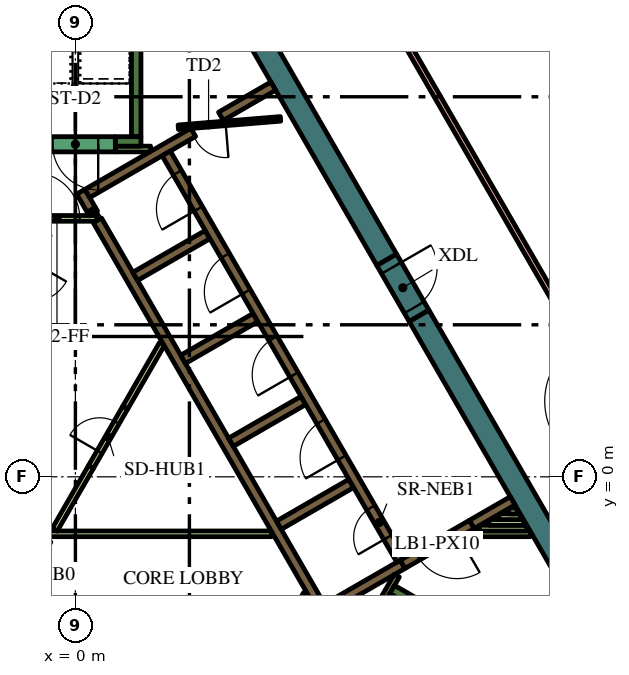
"""IFC4 building model, lengths in metres.
Left out: names, types, materials, properties, quantities, classifications, styles, units other than length and angle.
Written with IfcOpenShell. Run it as: python <this file> out.ifc"""

import sys

from ifc_helpers import new_model, si_unit, direction, frame, frame_2d, origin, place, context, subcontext, project, spatial, rectangle, extrude, element, fill, save


model = new_model("IFC4")
c1 = context("Model", 3, precision=1e-05, world=origin(), true_north=direction((0.0, 1.0)))
c2 = subcontext(c1, "Body", "Model", "MODEL_VIEW")
j1 = project(units=[si_unit("LENGTHUNIT", "METRE"), si_unit("PLANEANGLEUNIT", "RADIAN")], contexts=[c1])
p1 = place(None, origin())
s1 = spatial("IfcSite", under=j1, at=p1, CompositionType="ELEMENT")
p2 = place(p1, origin())
s2 = spatial("IfcBuilding", under=s1, at=p2, CompositionType="ELEMENT")
p3 = place(p2, frame((0.0, 0.0, 321.6)))
s3 = spatial("IfcBuildingStorey", under=s2, at=p3, CompositionType="ELEMENT", Elevation=321.6)
for number, where, z_axis, x_axis in (
    (1, (9.042, 4.239, 0.0), (0.0, 0.0, 1.0), (0.5, -0.866, 0.0)),
    (2, (1.989, 16.456, 0.0), (0.0, 0.0, 1.0), (0.5, -0.866, 0.0)),
):
    element("IfcWall", number, at=place(p3, frame(where, z_axis=z_axis, x_axis=x_axis)), inside=s3, PredefinedType="SOLIDWALL", context=c2, shape_type="SweptSolid", body=[
        extrude(rectangle(XDim=12.406, YDim=0.6, at=frame_2d((6.203, 0.0))), origin(), (0.0, 0.0, 1.0), 6.0),
    ])
p4 = place(p3, frame((8.334, -2.964, 0.0), z_axis=(0.0, 0.0, 1.0), x_axis=(0.866016039709, -0.500016218704, 0.0)))
e3 = element("IfcWall", 3, at=p4, inside=s3, PredefinedType="SOLIDWALL", context=c2, shape_type="SweptSolid", body=[
    extrude(rectangle(XDim=7.05, YDim=0.25, at=frame_2d((3.525, 0.0))), origin(), (0.0, 0.0, 1.0), 6.0),
])
p5 = place(p3, frame((8.168, -3.503, 0.0), z_axis=(0.0, 0.0, 1.0), x_axis=(0.49972245349, 0.866185586049, 0.0)))
e4 = element("IfcWall", 4, at=p5, inside=s3, PredefinedType="SOLIDWALL", context=c2, shape_type="SweptSolid", body=[
    extrude(rectangle(XDim=0.425, YDim=0.25, at=frame_2d((0.212, 0.0))), origin(), (0.0, 0.0, 1.0), 6.0),
])
p6 = place(p3, frame((1.6, 8.95, 0.0), z_axis=(0.0, 0.0, 1.0), x_axis=(0.0, 1.0, 0.0)))
e5 = element("IfcWall", 5, at=p6, inside=s3, PredefinedType="SOLIDWALL", context=c2, shape_type="SweptSolid", body=[
    extrude(rectangle(XDim=6.8, YDim=0.25, at=frame_2d((3.4, 0.0))), origin(), (0.0, 0.0, 1.0), 6.0),
])
p7 = place(p3, frame((1.05, 8.825, 0.0), z_axis=(0.0, 0.0, 1.0), x_axis=(1.0, 0.0, 0.0)))
e6 = element("IfcWall", 6, at=p7, inside=s3, PredefinedType="SOLIDWALL", context=c2, shape_type="SweptSolid", body=[
    extrude(rectangle(XDim=0.675, YDim=0.25, at=frame_2d((0.337, 0.0))), origin(), (0.0, 0.0, 1.0), 6.0),
])
p8 = place(p3, frame((11.507, -0.631, 0.0), z_axis=(0.0, 0.0, 1.0), x_axis=(-0.866025525965, -0.499999788377, 0.0)))
e7 = element("IfcWall", 7, at=p8, inside=s3, PredefinedType="SOLIDWALL", context=c2, shape_type="SweptSolid", body=[
    extrude(rectangle(XDim=1.245, YDim=0.25, at=frame_2d((0.622, 0.0))), origin(), (0.0, 0.0, 1.0), 6.0),
])
p9 = place(p3, frame((0.473, 6.93, 0.0), z_axis=(0.0, 0.0, 1.0), x_axis=(-0.49972245349, 0.866185586049, 0.0)))
e8 = element("IfcWall", 8, at=p9, inside=s3, PredefinedType="SOLIDWALL", context=c2, shape_type="SweptSolid", body=[
    extrude(rectangle(XDim=0.11, YDim=0.25, at=frame_2d((0.055, 0.0))), origin(), (0.0, 0.0, 1.0), 6.0),
])
p10 = place(p3, frame((6.568, -3.627, 0.0), z_axis=(0.0, 0.0, 1.0), x_axis=(-0.499999455981, 0.866025717874, 0.0)))
e9 = element("IfcWall", 9, at=p10, inside=s3, PredefinedType="SOLIDWALL", context=c2, shape_type="SweptSolid", body=[
    extrude(rectangle(XDim=11.978, YDim=0.25, at=frame_2d((5.989, 0.0))), origin(), (0.0, 0.0, 1.0), 6.0),
])
p11 = place(p3, frame((0.417, 7.027, 0.0), z_axis=(0.0, 0.0, 1.0), x_axis=(-0.500210807569, 0.865903659763, 0.0)))
e10 = element("IfcWall", 10, at=p11, inside=s3, PredefinedType="SOLIDWALL", context=c2, shape_type="SweptSolid", body=[
    extrude(rectangle(XDim=0.548, YDim=0.25, at=frame_2d((0.274, 0.0))), origin(), (0.0, 0.0, 1.0), 6.0),
])
p12 = place(p3, frame((3.1, 9.064, 0.0), z_axis=(0.0, 0.0, 1.0), x_axis=(-0.866030133475, -0.499991807846, 0.0)))
e11 = element("IfcWall", 11, at=p12, inside=s3, PredefinedType="SOLIDWALL", context=c2, shape_type="SweptSolid", body=[
    extrude(rectangle(XDim=3.217, YDim=0.25, at=frame_2d((1.608, 0.0))), origin(), (0.0, 0.0, 1.0), 6.0),
])
p13 = place(p3, frame((1.574, 5.274, 0.0), z_axis=(0.0, 0.0, 1.0), x_axis=(0.866028486751, 0.499994660107, 0.0)))
e12 = element("IfcWall", 12, at=p13, inside=s3, PredefinedType="SOLIDWALL", context=c2, shape_type="SweptSolid", body=[
    extrude(rectangle(XDim=2.2, YDim=0.25, at=frame_2d((1.1, 0.0))), origin(), (0.0, 0.0, 1.0), 6.0),
])
for number, where, z_axis, x_axis in (
    (13, (2.834, 3.091, 0.0), (0.0, 0.0, 1.0), (0.866, 0.5, 0.0)),
    (14, (4.094, 0.909, 0.0), (0.0, 0.0, 1.0), (0.866, 0.5, 0.0)),
    (15, (5.354, -1.274, 0.0), (0.0, 0.0, 1.0), (0.866, 0.5, 0.0)),
):
    element("IfcWall", number, at=place(p3, frame(where, z_axis=z_axis, x_axis=x_axis)), inside=s3, PredefinedType="SOLIDWALL", context=c2, shape_type="SweptSolid", body=[
        extrude(rectangle(XDim=2.2, YDim=0.25, at=frame_2d((1.1, 0.0))), origin(), (0.0, 0.0, 1.0), 6.0),
    ])
p14 = place(p3, frame((6.614, -3.456, 0.0), z_axis=(0.0, 0.0, 1.0), x_axis=(0.866025089694, 0.500000544019, 0.0)))
e16 = element("IfcWall", 16, at=p14, inside=s3, PredefinedType="SOLIDWALL", context=c2, shape_type="SweptSolid", body=[
    extrude(rectangle(XDim=2.305, YDim=0.25, at=frame_2d((1.153, 0.0))), origin(), (0.0, 0.0, 1.0), 6.0),
])
p15 = place(p3, frame((3.83, 9.486, 0.0), z_axis=(0.0, 0.0, 1.0), x_axis=(0.865986202621, 0.500067892261, 0.0)))
e17 = element("IfcWall", 17, at=p15, inside=s3, PredefinedType="SOLIDWALL", context=c2, shape_type="SweptSolid", body=[
    extrude(rectangle(XDim=1.591, YDim=0.25, at=frame_2d((0.795, 0.0))), origin(), (0.0, 0.0, 1.0), 6.0),
])
p16 = place(p3, frame((1.05, 8.625, 0.0), z_axis=(0.0, 0.0, 1.0), x_axis=(1.0, 0.0, 0.0)))
e18 = element("IfcWall", 18, at=p16, inside=s3, PredefinedType="PARTITIONING", context=c2, shape_type="SweptSolid", body=[
    extrude(rectangle(XDim=0.929, YDim=0.15, at=frame_2d((0.464, 0.0))), origin(), (0.0, 0.0, 1.0), 5.3),
])
p17 = place(p3, frame((10.362, -1.5, 0.0), z_axis=(0.0, 0.0, 1.0), x_axis=(1.0, 0.0, 0.0)))
e19 = element("IfcWall", 19, at=p17, inside=s3, PredefinedType="PARTITIONING", context=c2, shape_type="SweptSolid", body=[
    extrude(rectangle(XDim=1.61, YDim=0.15, at=frame_2d((0.805, 0.0))), origin(), (0.0, 0.0, 1.0), 5.3),
])
p18 = place(p3, frame((10.622, -1.35, 0.0), z_axis=(0.0, 0.0, 1.0), x_axis=(1.0, 0.0, 0.0)))
e20 = element("IfcWall", 20, at=p18, inside=s3, PredefinedType="PARTITIONING", context=c2, shape_type="SweptSolid", body=[
    extrude(rectangle(XDim=1.263, YDim=0.15, at=frame_2d((0.632, 0.0))), origin(), (0.0, 0.0, 1.0), 5.3),
])
p19 = place(p3, frame((10.882, -1.2, 0.0), z_axis=(0.0, 0.0, 1.0), x_axis=(1.0, 0.0, 0.0)))
e21 = element("IfcWall", 21, at=p19, inside=s3, PredefinedType="PARTITIONING", context=c2, shape_type="SweptSolid", body=[
    extrude(rectangle(XDim=0.917, YDim=0.15, at=frame_2d((0.459, 0.0))), origin(), (0.0, 0.0, 1.0), 5.3),
])
p20 = place(p3, frame((11.712, -1.05, 0.0), z_axis=(0.0, 0.0, 1.0), x_axis=(-1.0, 0.0, 0.0)))
e22 = element("IfcWall", 22, at=p20, inside=s3, PredefinedType="PARTITIONING", context=c2, shape_type="SweptSolid", body=[
    extrude(rectangle(XDim=0.571, YDim=0.15, at=frame_2d((0.285, 0.0))), origin(), (0.0, 0.0, 1.0), 5.3),
])
p21 = place(p3, frame((11.401, -0.9, 0.0), z_axis=(0.0, 0.0, 1.0), x_axis=(1.0, 0.0, 0.0)))
e23 = element("IfcWall", 23, at=p21, inside=s3, PredefinedType="PARTITIONING", context=c2, shape_type="SweptSolid", body=[
    extrude(rectangle(XDim=0.224, YDim=0.15, at=frame_2d((0.112, 0.0))), origin(), (0.0, 0.0, 1.0), 5.3),
])
p22 = place(p3, frame((8.459, -2.599, 0.0), z_axis=(0.0, 0.0, 1.0), x_axis=(-0.500041054325, -0.866001699761, 0.0)))
e24 = element("IfcWall", 24, at=p22, inside=s3, PredefinedType="PARTITIONING", context=c2, shape_type="SweptSolid", body=[
    extrude(rectangle(XDim=0.929, YDim=0.15, at=frame_2d((0.464, 0.0))), origin(), (0.0, 0.0, 1.0), 6.0),
])
p23 = place(p3, frame((5.705, -3.718, 0.0), z_axis=(0.0, 0.0, 1.0), x_axis=(0.499962090823, 0.866047289552, 0.0)))
e25 = element("IfcWall", 25, at=p23, inside=s3, PredefinedType="PARTITIONING", context=c2, shape_type="SweptSolid", body=[
    extrude(rectangle(XDim=0.735, YDim=0.15, at=frame_2d((0.367, 0.0))), origin(), (0.0, 0.0, 1.0), 5.3),
])
p24 = place(p3, frame((-4.2, -1.5, 0.0), z_axis=(0.0, 0.0, 1.0), x_axis=(1.0, 0.0, 0.0)))
e26 = element("IfcWall", 26, at=p24, inside=s3, PredefinedType="PARTITIONING", context=c2, shape_type="SweptSolid", body=[
    extrude(rectangle(XDim=9.359, YDim=0.15, at=frame_2d((4.68, 0.0))), origin(), (0.0, 0.0, 1.0), 5.3),
])
p25 = place(p3, frame((-0.544, -1.393, 0.0), z_axis=(0.0, 0.0, 1.0), x_axis=(0.499928740635, 0.866066541489, 0.0)))
e27 = element("IfcWall", 27, at=p25, inside=s3, PredefinedType="PARTITIONING", context=c2, shape_type="SweptSolid", body=[
    extrude(rectangle(XDim=1.912, YDim=0.15, at=frame_2d((0.956, 0.0))), origin(), (0.0, 0.0, 1.0), 5.3),
])
p26 = place(p3, frame((1.312, 1.822, 0.0), z_axis=(0.0, 0.0, 1.0), x_axis=(0.500003549559, 0.866023354436, 0.0)))
e28 = element("IfcWall", 28, at=p26, inside=s3, PredefinedType="PARTITIONING", context=c2, shape_type="SweptSolid", body=[
    extrude(rectangle(XDim=1.93, YDim=0.15, at=frame_2d((0.965, 0.0))), origin(), (0.0, 0.0, 1.0), 5.3),
])
p27 = place(p3, frame((8.565, -2.185, 0.0), z_axis=(0.0, 0.0, 1.0), x_axis=(-0.499997954832, 0.866026584559, 0.0)))
e29 = element("IfcWall", 29, at=p27, inside=s3, PredefinedType="SOLIDWALL", context=c2, shape_type="SweptSolid", body=[
    extrude(rectangle(XDim=12.35, YDim=0.25, at=frame_2d((6.175, 0.0))), origin(), (0.0, 0.0, 1.0), 6.0),
])
p28 = place(p27, frame((0.685, 0.0, 0.0)))
e30 = element("IfcOpeningElement", 30, at=p28, cuts=e29, PredefinedType="OPENING", context=c2, shape_type="SweptSolid", body=[
    extrude(rectangle(XDim=0.9, YDim=2.1, at=frame_2d((0.45, 1.05))), frame((0.0, 0.135, 0.0), z_axis=(0.0, -1.0, 0.0), x_axis=(1.0, 0.0, 0.0)), (0.0, 0.0, 1.0), 0.27),
])
p29 = place(p27, frame((3.105, 0.0, 0.0)))
e31 = element("IfcOpeningElement", 31, at=p29, cuts=e29, PredefinedType="OPENING", context=c2, shape_type="SweptSolid", body=[
    extrude(rectangle(XDim=1.1, YDim=2.1, at=frame_2d((0.55, 1.05))), frame((0.0, 0.135, 0.0), z_axis=(0.0, -1.0, 0.0), x_axis=(1.0, 0.0, 0.0)), (0.0, 0.0, 1.0), 0.27),
])
p30 = place(p27, frame((5.625, 0.0, 0.0)))
e32 = element("IfcOpeningElement", 32, at=p30, cuts=e29, PredefinedType="OPENING", context=c2, shape_type="SweptSolid", body=[
    extrude(rectangle(XDim=1.1, YDim=2.1, at=frame_2d((0.55, 1.05))), frame((0.0, 0.135, 0.0), z_axis=(0.0, -1.0, 0.0), x_axis=(1.0, 0.0, 0.0)), (0.0, 0.0, 1.0), 0.27),
])
p31 = place(p27, frame((8.145, 0.0, 0.0)))
e33 = element("IfcOpeningElement", 33, at=p31, cuts=e29, PredefinedType="OPENING", context=c2, shape_type="SweptSolid", body=[
    extrude(rectangle(XDim=1.1, YDim=2.1, at=frame_2d((0.55, 1.05))), frame((0.0, 0.135, 0.0), z_axis=(0.0, -1.0, 0.0), x_axis=(1.0, 0.0, 0.0)), (0.0, 0.0, 1.0), 0.27),
])
p32 = place(p27, frame((10.665, 0.0, 0.0)))
e34 = element("IfcOpeningElement", 34, at=p32, cuts=e29, PredefinedType="OPENING", context=c2, shape_type="SweptSolid", body=[
    extrude(rectangle(XDim=1.1, YDim=2.1, at=frame_2d((0.55, 1.05))), frame((0.0, 0.135, 0.0), z_axis=(0.0, -1.0, 0.0), x_axis=(1.0, 0.0, 0.0)), (0.0, 0.0, 1.0), 0.27),
])
p33 = place(p3, frame((1.05, 8.75, 0.0), z_axis=(0.0, 0.0, 1.0), x_axis=(-1.0, 0.0, 0.0)))
e35 = element("IfcWall", 35, at=p33, inside=s3, PredefinedType="SOLIDWALL", context=c2, shape_type="SweptSolid", body=[
    extrude(rectangle(XDim=2.1, YDim=0.4, at=frame_2d((1.05, 0.0))), origin(), (0.0, 0.0, 1.0), 6.0),
])
p34 = place(p33, frame((0.45, 0.0, 0.0)))
e36 = element("IfcOpeningElement", 36, at=p34, cuts=e35, PredefinedType="OPENING", context=c2, shape_type="SweptSolid", body=[
    extrude(rectangle(XDim=1.2, YDim=2.1, at=frame_2d((0.6, 1.05))), frame((0.0, 0.21, 0.0), z_axis=(0.0, -1.0, 0.0), x_axis=(1.0, 0.0, 0.0)), (0.0, 0.0, 1.0), 0.42),
])
p35 = place(p3, frame((5.398, 9.419, 0.0), z_axis=(0.0, 0.0, 1.0), x_axis=(-0.996653416376, -0.081743303248, 0.0)))
e37 = element("IfcWall", 37, at=p35, inside=s3, PredefinedType="PARTITIONING", context=c2, shape_type="SweptSolid", body=[
    extrude(rectangle(XDim=2.7, YDim=0.12, at=frame_2d((1.35, 0.0))), origin(), (0.0, 0.0, 1.0), 5.3),
])
p36 = place(p35, frame((1.45, 0.0, 0.0)))
e38 = element("IfcOpeningElement", 38, at=p36, cuts=e37, PredefinedType="OPENING", context=c2, shape_type="SweptSolid", body=[
    extrude(rectangle(XDim=0.9, YDim=2.1, at=frame_2d((0.45, 1.05))), frame((0.0, 0.07, 0.0), z_axis=(0.0, -1.0, 0.0), x_axis=(1.0, 0.0, 0.0)), (0.0, 0.0, 1.0), 0.14),
])
p37 = place(p3, frame((-1.534, 6.8, 0.0), z_axis=(0.0, 0.0, 1.0), x_axis=(1.0, 0.0, 0.0)))
e39 = element("IfcWall", 39, at=p37, inside=s3, PredefinedType="PARTITIONING", context=c2, shape_type="SweptSolid", body=[
    extrude(rectangle(XDim=2.1, YDim=0.15, at=frame_2d((1.05, 0.0))), origin(), (0.0, 0.0, 1.0), 5.3),
])
p38 = place(p37, frame((0.45, 0.0, 0.0)))
e40 = element("IfcOpeningElement", 40, at=p38, cuts=e39, PredefinedType="OPENING", context=c2, shape_type="SweptSolid", body=[
    extrude(rectangle(XDim=1.2, YDim=2.1, at=frame_2d((0.6, 1.05))), frame((0.0, 0.085, 0.0), z_axis=(0.0, -1.0, 0.0), x_axis=(1.0, 0.0, 0.0)), (0.0, 0.0, 1.0), 0.17),
])
p39 = place(p3, frame((10.429, -1.253, 0.0), z_axis=(0.0, 0.0, 1.0), x_axis=(-0.866009402589, -0.500027713859, 0.0)))
e41 = element("IfcWall", 41, at=p39, inside=s3, PredefinedType="SOLIDWALL", context=c2, shape_type="SweptSolid", body=[
    extrude(rectangle(XDim=2.1, YDim=0.25, at=frame_2d((1.05, 0.0))), origin(), (0.0, 0.0, 1.0), 6.0),
])
p40 = place(p39, frame((0.45, 0.0, 0.0)))
e42 = element("IfcOpeningElement", 42, at=p40, cuts=e41, PredefinedType="OPENING", context=c2, shape_type="SweptSolid", body=[
    extrude(rectangle(XDim=1.2, YDim=2.1, at=frame_2d((0.6, 1.05))), frame((0.0, 0.135, 0.0), z_axis=(0.0, -1.0, 0.0), x_axis=(1.0, 0.0, 0.0)), (0.0, 0.0, 1.0), 0.27),
])
p41 = place(p3, frame((8.192, 5.711, 0.0), z_axis=(0.0, 0.0, 1.0), x_axis=(0.500062241894, -0.865989465428, 0.0)))
e43 = element("IfcWall", 43, at=p41, inside=s3, PredefinedType="SOLIDWALL", context=c2, shape_type="SweptSolid", body=[
    extrude(rectangle(XDim=1.7, YDim=0.6, at=frame_2d((0.85, 0.0))), origin(), (0.0, 0.0, 1.0), 6.0),
])
p42 = place(p41, frame((0.25, 0.0, 0.0)))
e44 = element("IfcOpeningElement", 44, at=p42, cuts=e43, PredefinedType="OPENING", context=c2, shape_type="SweptSolid", body=[
    extrude(rectangle(XDim=1.2, YDim=2.1, at=frame_2d((0.6, 1.05))), frame((0.0, 0.31, 0.0), z_axis=(0.0, -1.0, 0.0), x_axis=(1.0, 0.0, 0.0)), (0.0, 0.0, 1.0), 0.62),
])
p43 = place(p3, frame((0.412, 0.263, 0.0), z_axis=(0.0, 0.0, 1.0), x_axis=(0.500062916607, 0.865989075817, 0.0)))
e45 = element("IfcWall", 45, at=p43, inside=s3, PredefinedType="PARTITIONING", context=c2, shape_type="SweptSolid", body=[
    extrude(rectangle(XDim=1.8, YDim=0.15, at=frame_2d((0.9, 0.0))), origin(), (0.0, 0.0, 1.0), 5.3),
])
p44 = place(p43, frame((0.45, 0.0, 0.0)))
e46 = element("IfcOpeningElement", 46, at=p44, cuts=e45, PredefinedType="OPENING", context=c2, shape_type="SweptSolid", body=[
    extrude(rectangle(XDim=0.9, YDim=2.1, at=frame_2d((0.45, 1.05))), frame((0.0, 0.085, 0.0), z_axis=(0.0, -1.0, 0.0), x_axis=(1.0, 0.0, 0.0)), (0.0, 0.0, 1.0), 0.17),
])
p45 = place(p3, frame((18.966, -6.35, 0.0), z_axis=(0.0, 0.0, 1.0), x_axis=(-0.499998353063, 0.866026354642, 0.0)))
e47 = element("IfcWall", 47, at=p45, inside=s3, PredefinedType="PARTITIONING", context=c2, shape_type="SweptSolid", body=[
    extrude(rectangle(XDim=21.064, YDim=0.15, at=frame_2d((10.532, 0.0))), origin(), (0.0, 0.0, 1.0), 5.3),
])
p46 = place(p45, frame((9.632, 0.0, 0.0)))
e48 = element("IfcOpeningElement", 48, at=p46, cuts=e47, PredefinedType="OPENING", context=c2, shape_type="SweptSolid", body=[
    extrude(rectangle(XDim=1.8, YDim=2.1, at=frame_2d((0.9, 1.05))), frame((0.0, 0.085, 0.0), z_axis=(0.0, -1.0, 0.0), x_axis=(1.0, 0.0, 0.0)), (0.0, 0.0, 1.0), 0.17),
])
p47 = place(p45, frame((6.779, 0.0, 0.0)))
e49 = element("IfcOpeningElement", 49, at=p47, cuts=e47, PredefinedType="OPENING", context=c2, shape_type="SweptSolid", body=[
    extrude(rectangle(XDim=1.8, YDim=2.1, at=frame_2d((0.9, 1.05))), frame((0.0, 0.085, 0.0), z_axis=(0.0, -1.0, 0.0), x_axis=(1.0, 0.0, 0.0)), (0.0, 0.0, 1.0), 0.17),
])
p48 = place(p28, origin())
e50 = element("IfcDoor", 50, at=p48, inside=s3, OperationType="SINGLE_SWING_LEFT", PredefinedType="DOOR", context=c2, shape_type="SweptSolid", body=[
    extrude(rectangle(XDim=0.9, YDim=2.1, at=frame_2d((0.45, 1.05))), frame((0.0, 0.025, 0.0), z_axis=(0.0, -1.0, 0.0), x_axis=(1.0, 0.0, 0.0)), (0.0, 0.0, 1.0), 0.05),
])
fill(e30, e50)
p49 = place(p29, origin())
e51 = element("IfcDoor", 51, at=p49, inside=s3, OperationType="DOUBLE_DOOR_SLIDING", PredefinedType="DOOR", context=c2, shape_type="SweptSolid", body=[
    extrude(rectangle(XDim=1.1, YDim=2.1, at=frame_2d((0.55, 1.05))), frame((0.0, 0.025, 0.0), z_axis=(0.0, -1.0, 0.0), x_axis=(1.0, 0.0, 0.0)), (0.0, 0.0, 1.0), 0.05),
])
fill(e31, e51)
p50 = place(p30, origin())
e52 = element("IfcDoor", 52, at=p50, inside=s3, OperationType="DOUBLE_DOOR_SLIDING", PredefinedType="DOOR", context=c2, shape_type="SweptSolid", body=[
    extrude(rectangle(XDim=1.1, YDim=2.1, at=frame_2d((0.55, 1.05))), frame((0.0, 0.025, 0.0), z_axis=(0.0, -1.0, 0.0), x_axis=(1.0, 0.0, 0.0)), (0.0, 0.0, 1.0), 0.05),
])
fill(e32, e52)
p51 = place(p31, origin())
e53 = element("IfcDoor", 53, at=p51, inside=s3, OperationType="DOUBLE_DOOR_SLIDING", PredefinedType="DOOR", context=c2, shape_type="SweptSolid", body=[
    extrude(rectangle(XDim=1.1, YDim=2.1, at=frame_2d((0.55, 1.05))), frame((0.0, 0.025, 0.0), z_axis=(0.0, -1.0, 0.0), x_axis=(1.0, 0.0, 0.0)), (0.0, 0.0, 1.0), 0.05),
])
fill(e33, e53)
p52 = place(p32, origin())
e54 = element("IfcDoor", 54, at=p52, inside=s3, OperationType="DOUBLE_DOOR_SLIDING", PredefinedType="DOOR", context=c2, shape_type="SweptSolid", body=[
    extrude(rectangle(XDim=1.1, YDim=2.1, at=frame_2d((0.55, 1.05))), frame((0.0, 0.025, 0.0), z_axis=(0.0, -1.0, 0.0), x_axis=(1.0, 0.0, 0.0)), (0.0, 0.0, 1.0), 0.05),
])
fill(e34, e54)
p53 = place(p34, origin())
e55 = element("IfcDoor", 55, at=p53, inside=s3, OperationType="SINGLE_SWING_LEFT", PredefinedType="DOOR", context=c2, shape_type="SweptSolid", body=[
    extrude(rectangle(XDim=1.2, YDim=2.1, at=frame_2d((0.6, 1.05))), frame((0.0, 0.025, 0.0), z_axis=(0.0, -1.0, 0.0), x_axis=(1.0, 0.0, 0.0)), (0.0, 0.0, 1.0), 0.05),
])
fill(e36, e55)
p54 = place(p36, origin())
e56 = element("IfcDoor", 56, at=p54, inside=s3, OperationType="SINGLE_SWING_LEFT", PredefinedType="DOOR", context=c2, shape_type="SweptSolid", body=[
    extrude(rectangle(XDim=0.9, YDim=2.1, at=frame_2d((0.45, 1.05))), frame((0.0, 0.025, 0.0), z_axis=(0.0, -1.0, 0.0), x_axis=(1.0, 0.0, 0.0)), (0.0, 0.0, 1.0), 0.05),
])
fill(e38, e56)
p55 = place(p38, origin())
e57 = element("IfcDoor", 57, at=p55, inside=s3, OperationType="SINGLE_SWING_LEFT", PredefinedType="DOOR", context=c2, shape_type="SweptSolid", body=[
    extrude(rectangle(XDim=1.2, YDim=2.1, at=frame_2d((0.6, 1.05))), frame((0.0, 0.025, 0.0), z_axis=(0.0, -1.0, 0.0), x_axis=(1.0, 0.0, 0.0)), (0.0, 0.0, 1.0), 0.05),
])
fill(e40, e57)
p56 = place(p40, origin())
e58 = element("IfcDoor", 58, at=p56, inside=s3, OperationType="SINGLE_SWING_LEFT", PredefinedType="DOOR", context=c2, shape_type="SweptSolid", body=[
    extrude(rectangle(XDim=1.2, YDim=2.1, at=frame_2d((0.6, 1.05))), frame((0.0, 0.025, 0.0), z_axis=(0.0, -1.0, 0.0), x_axis=(1.0, 0.0, 0.0)), (0.0, 0.0, 1.0), 0.05),
])
fill(e42, e58)
p57 = place(p42, origin())
e59 = element("IfcDoor", 59, at=p57, inside=s3, OperationType="SINGLE_SWING_LEFT", PredefinedType="DOOR", context=c2, shape_type="SweptSolid", body=[
    extrude(rectangle(XDim=1.2, YDim=2.1, at=frame_2d((0.6, 1.05))), frame((0.0, 0.025, 0.0), z_axis=(0.0, -1.0, 0.0), x_axis=(1.0, 0.0, 0.0)), (0.0, 0.0, 1.0), 0.05),
])
fill(e44, e59)
p58 = place(p44, origin())
e60 = element("IfcDoor", 60, at=p58, inside=s3, OperationType="SINGLE_SWING_LEFT", PredefinedType="DOOR", context=c2, shape_type="SweptSolid", body=[
    extrude(rectangle(XDim=0.9, YDim=2.1, at=frame_2d((0.45, 1.05))), frame((0.0, 0.025, 0.0), z_axis=(0.0, -1.0, 0.0), x_axis=(1.0, 0.0, 0.0)), (0.0, 0.0, 1.0), 0.05),
])
fill(e46, e60)
save(model, sys.argv[1])
